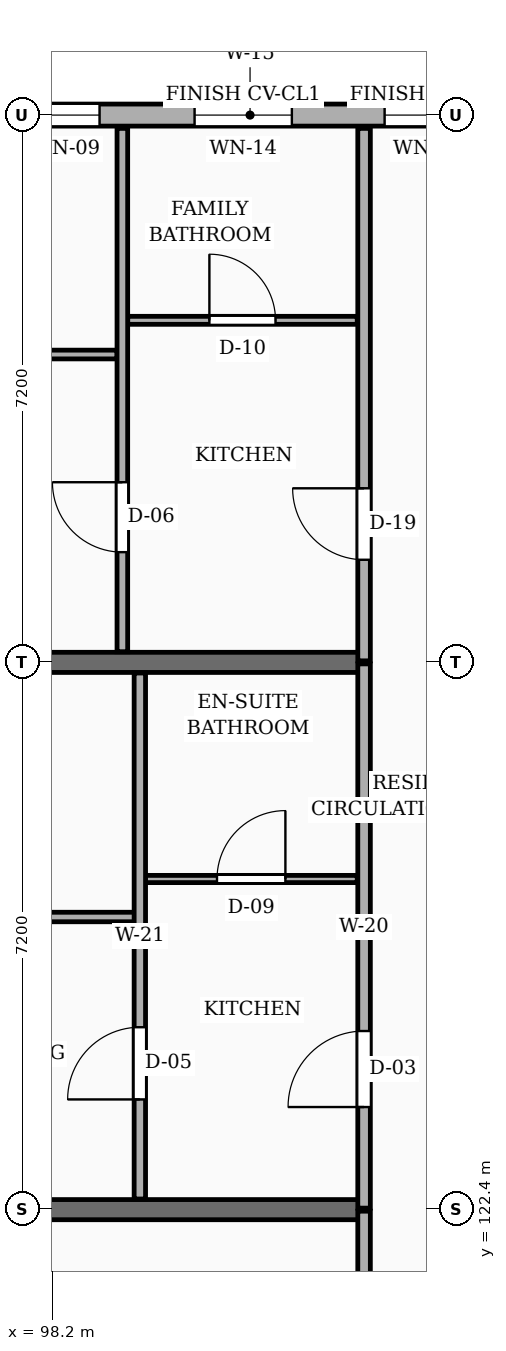
"""IFC4 building model, lengths in metres.
Left out: names, types, materials, properties, quantities, classifications, styles, units other than length and angle.
Written with IfcOpenShell. Run it as: python <this file> out.ifc"""

import sys

from ifc_helpers import new_model, si_unit, direction, frame, frame_2d, origin, place, context, subcontext, project, spatial, rectangle, extrude, element, fill, save


model = new_model("IFC4")
c1 = context("Model", 3, precision=1e-05, world=origin(), true_north=direction((0.0, 1.0)))
c2 = subcontext(c1, "Body", "Model", "MODEL_VIEW")
j1 = project(units=[si_unit("LENGTHUNIT", "METRE"), si_unit("PLANEANGLEUNIT", "RADIAN")], contexts=[c1])
p1 = place(None, origin())
s1 = spatial("IfcSite", under=j1, at=p1, CompositionType="ELEMENT")
p2 = place(p1, origin())
s2 = spatial("IfcBuilding", under=s1, at=p2, CompositionType="ELEMENT")
p3 = place(p2, frame((0.0, 0.0, 7.65)))
s3 = spatial("IfcBuildingStorey", under=s2, at=p3, CompositionType="ELEMENT", Elevation=7.65)
for number, where, z_axis, x_axis in (
    (1, (90.3, 122.4, 0.0), (0.0, 0.0, 1.0), (1.0, 0.0, 0.0)),
    (2, (90.3, 129.6, 0.0), (0.0, 0.0, 1.0), (1.0, 0.0, 0.0)),
):
    element("IfcWall", number, at=place(p3, frame(where, z_axis=z_axis, x_axis=x_axis)), inside=s3, PredefinedType="SOLIDWALL", context=c2, shape_type="SweptSolid", body=[
        extrude(rectangle(XDim=12.0, YDim=0.265, at=frame_2d((6.0, 0.0))), origin(), (0.0, 0.0, 1.0), 2.19),
    ])
p4 = place(p3, frame((104.1, 136.8, 0.0), z_axis=(0.0, 0.0, 1.0), x_axis=(-1.0, 0.0, 0.0)))
e3 = element("IfcWall", 3, at=p4, inside=s3, PredefinedType="SOLIDWALL", context=c2, shape_type="SweptSolid", body=[
    extrude(rectangle(XDim=6.6, YDim=0.29, at=frame_2d((3.3, 0.0))), origin(), (0.0, 0.0, 1.0), 2.46),
])
p5 = place(p4, frame((0.41, 0.0, 0.78)))
e4 = element("IfcOpeningElement", 4, at=p5, cuts=e3, PredefinedType="OPENING", context=c2, shape_type="SweptSolid", body=[
    extrude(rectangle(XDim=1.12, YDim=1.26, at=frame_2d((0.56, 0.63))), frame((0.0, 0.155, 0.0), z_axis=(0.0, -1.0, 0.0), x_axis=(1.0, 0.0, 0.0)), (0.0, 0.0, 1.0), 0.31),
])
p6 = place(p4, frame((2.75, 0.0, 0.78)))
e5 = element("IfcOpeningElement", 5, at=p6, cuts=e3, PredefinedType="OPENING", context=c2, shape_type="SweptSolid", body=[
    extrude(rectangle(XDim=1.28, YDim=1.26, at=frame_2d((0.64, 0.63))), frame((0.0, 0.155, 0.0), z_axis=(0.0, -1.0, 0.0), x_axis=(1.0, 0.0, 0.0)), (0.0, 0.0, 1.0), 0.31),
])
p7 = place(p4, frame((5.28, 0.0, 0.78)))
e6 = element("IfcOpeningElement", 6, at=p7, cuts=e3, PredefinedType="OPENING", context=c2, shape_type="SweptSolid", body=[
    extrude(rectangle(XDim=0.88, YDim=1.26, at=frame_2d((0.44, 0.63))), frame((0.0, 0.155, 0.0), z_axis=(0.0, -1.0, 0.0), x_axis=(1.0, 0.0, 0.0)), (0.0, 0.0, 1.0), 0.31),
])
p8 = place(p3, frame((102.3, 115.22, 0.0), z_axis=(0.0, 0.0, 1.0), x_axis=(0.0, 1.0, 0.0)))
e7 = element("IfcWall", 7, at=p8, inside=s3, PredefinedType="PARTITIONING", context=c2, shape_type="SweptSolid", body=[
    extrude(rectangle(XDim=7.16, YDim=0.165, at=frame_2d((3.58, 0.0))), origin(), (0.0, 0.0, 1.0), 2.325),
])
p9 = place(p8, frame((4.78, 0.0, 0.0)))
e8 = element("IfcOpeningElement", 8, at=p9, cuts=e7, PredefinedType="OPENING", context=c2, shape_type="SweptSolid", body=[
    extrude(rectangle(XDim=1.14, YDim=2.18, at=frame_2d((0.57, 1.09))), frame((0.0, 0.093, 0.0), z_axis=(0.0, -1.0, 0.0), x_axis=(1.0, 0.0, 0.0)), (0.0, 0.0, 1.0), 0.185),
])
p10 = place(p3, frame((102.3, 122.42, 0.0), z_axis=(0.0, 0.0, 1.0), x_axis=(0.0, 1.0, 0.0)))
e9 = element("IfcWall", 9, at=p10, inside=s3, PredefinedType="PARTITIONING", context=c2, shape_type="SweptSolid", body=[
    extrude(rectangle(XDim=7.16, YDim=0.165, at=frame_2d((3.58, 0.0))), origin(), (0.0, 0.0, 1.0), 2.325),
])
p11 = place(p10, frame((1.33, 0.0, 0.0)))
e10 = element("IfcOpeningElement", 10, at=p11, cuts=e9, PredefinedType="OPENING", context=c2, shape_type="SweptSolid", body=[
    extrude(rectangle(XDim=1.0, YDim=2.15, at=frame_2d((0.5, 1.075))), frame((0.0, 0.093, 0.0), z_axis=(0.0, -1.0, 0.0), x_axis=(1.0, 0.0, 0.0)), (0.0, 0.0, 1.0), 0.185),
])
p12 = place(p3, frame((102.3, 129.62, 0.0), z_axis=(0.0, 0.0, 1.0), x_axis=(0.0, 1.0, 0.0)))
e11 = element("IfcWall", 11, at=p12, inside=s3, PredefinedType="PARTITIONING", context=c2, shape_type="SweptSolid", body=[
    extrude(rectangle(XDim=7.005, YDim=0.165, at=frame_2d((3.502, 0.0))), origin(), (0.0, 0.0, 1.0), 2.325),
])
p13 = place(p12, frame((1.33, 0.0, 0.0)))
e12 = element("IfcOpeningElement", 12, at=p13, cuts=e11, PredefinedType="OPENING", context=c2, shape_type="SweptSolid", body=[
    extrude(rectangle(XDim=0.94, YDim=2.12, at=frame_2d((0.47, 1.06))), frame((0.0, 0.093, 0.0), z_axis=(0.0, -1.0, 0.0), x_axis=(1.0, 0.0, 0.0)), (0.0, 0.0, 1.0), 0.185),
])
p14 = place(p3, frame((90.175, 126.25, 0.0), z_axis=(0.0, 0.0, 1.0), x_axis=(1.0, 0.0, 0.0)))
e13 = element("IfcWall", 13, at=p14, inside=s3, PredefinedType="PARTITIONING", context=c2, shape_type="SweptSolid", body=[
    extrude(rectangle(XDim=9.105, YDim=0.125, at=frame_2d((4.552, 0.0))), origin(), (0.0, 0.0, 1.0), 2.325),
])
p15 = place(p14, frame((4.103, 0.0, 0.0)))
e14 = element("IfcOpeningElement", 14, at=p15, cuts=e13, PredefinedType="OPENING", context=c2, shape_type="SweptSolid", body=[
    extrude(rectangle(XDim=0.9, YDim=2.1, at=frame_2d((0.45, 1.05))), frame((0.0, 0.073, 0.0), z_axis=(0.0, -1.0, 0.0), x_axis=(1.0, 0.0, 0.0)), (0.0, 0.0, 1.0), 0.145),
])
p16 = place(p3, frame((99.42, 126.75, 0.0), z_axis=(0.0, 0.0, 1.0), x_axis=(1.0, 0.0, 0.0)))
e15 = element("IfcWall", 15, at=p16, inside=s3, PredefinedType="PARTITIONING", context=c2, shape_type="SweptSolid", body=[
    extrude(rectangle(XDim=2.79, YDim=0.095, at=frame_2d((1.395, 0.0))), origin(), (0.0, 0.0, 1.0), 2.325),
])
p17 = place(p16, frame((0.945, 0.0, 0.0)))
e16 = element("IfcOpeningElement", 16, at=p17, cuts=e15, PredefinedType="OPENING", context=c2, shape_type="SweptSolid", body=[
    extrude(rectangle(XDim=0.9, YDim=2.05, at=frame_2d((0.45, 1.025))), frame((0.0, 0.058, 0.0), z_axis=(0.0, -1.0, 0.0), x_axis=(1.0, 0.0, 0.0)), (0.0, 0.0, 1.0), 0.115),
])
p18 = place(p3, frame((99.35, 122.54, 0.0), z_axis=(0.0, 0.0, 1.0), x_axis=(0.0, 1.0, 0.0)))
e17 = element("IfcWall", 17, at=p18, inside=s3, PredefinedType="PARTITIONING", context=c2, shape_type="SweptSolid", body=[
    extrude(rectangle(XDim=6.92, YDim=0.15, at=frame_2d((3.46, 0.0))), origin(), (0.0, 0.0, 1.0), 2.325),
])
p19 = place(p18, frame((1.31, 0.0, 0.0)))
e18 = element("IfcOpeningElement", 18, at=p19, cuts=e17, PredefinedType="OPENING", context=c2, shape_type="SweptSolid", body=[
    extrude(rectangle(XDim=0.95, YDim=2.1, at=frame_2d((0.475, 1.05))), frame((0.0, 0.085, 0.0), z_axis=(0.0, -1.0, 0.0), x_axis=(1.0, 0.0, 0.0)), (0.0, 0.0, 1.0), 0.17),
])
p20 = place(p3, frame((90.175, 133.65, 0.0), z_axis=(0.0, 0.0, 1.0), x_axis=(1.0, 0.0, 0.0)))
e19 = element("IfcWall", 19, at=p20, inside=s3, PredefinedType="PARTITIONING", context=c2, shape_type="SweptSolid", body=[
    extrude(rectangle(XDim=8.875, YDim=0.115, at=frame_2d((4.438, 0.0))), origin(), (0.0, 0.0, 1.0), 2.325),
])
p21 = place(p20, frame((3.998, 0.0, 0.0)))
e20 = element("IfcOpeningElement", 20, at=p21, cuts=e19, PredefinedType="OPENING", context=c2, shape_type="SweptSolid", body=[
    extrude(rectangle(XDim=0.88, YDim=2.08, at=frame_2d((0.44, 1.04))), frame((0.0, 0.067, 0.0), z_axis=(0.0, -1.0, 0.0), x_axis=(1.0, 0.0, 0.0)), (0.0, 0.0, 1.0), 0.135),
])
p22 = place(p3, frame((99.19, 134.1, 0.0), z_axis=(0.0, 0.0, 1.0), x_axis=(1.0, 0.0, 0.0)))
e21 = element("IfcWall", 21, at=p22, inside=s3, PredefinedType="PARTITIONING", context=c2, shape_type="SweptSolid", body=[
    extrude(rectangle(XDim=3.02, YDim=0.105, at=frame_2d((1.51, 0.0))), origin(), (0.0, 0.0, 1.0), 2.325),
])
p23 = place(p22, frame((1.075, 0.0, 0.0)))
e22 = element("IfcOpeningElement", 22, at=p23, cuts=e21, PredefinedType="OPENING", context=c2, shape_type="SweptSolid", body=[
    extrude(rectangle(XDim=0.87, YDim=2.05, at=frame_2d((0.435, 1.025))), frame((0.0, 0.062, 0.0), z_axis=(0.0, -1.0, 0.0), x_axis=(1.0, 0.0, 0.0)), (0.0, 0.0, 1.0), 0.125),
])
p24 = place(p3, frame((99.12, 129.74, 0.0), z_axis=(0.0, 0.0, 1.0), x_axis=(0.0, 1.0, 0.0)))
e23 = element("IfcWall", 23, at=p24, inside=s3, PredefinedType="PARTITIONING", context=c2, shape_type="SweptSolid", body=[
    extrude(rectangle(XDim=6.885, YDim=0.14, at=frame_2d((3.442, 0.0))), origin(), (0.0, 0.0, 1.0), 2.325),
])
p25 = place(p24, frame((1.31, 0.0, 0.0)))
e24 = element("IfcOpeningElement", 24, at=p25, cuts=e23, PredefinedType="OPENING", context=c2, shape_type="SweptSolid", body=[
    extrude(rectangle(XDim=0.92, YDim=2.1, at=frame_2d((0.46, 1.05))), frame((0.0, 0.08, 0.0), z_axis=(0.0, -1.0, 0.0), x_axis=(1.0, 0.0, 0.0)), (0.0, 0.0, 1.0), 0.16),
])
p26 = place(p5, origin())
e25 = element("IfcWindow", 25, at=p26, inside=s3, PartitioningType="SINGLE_PANEL", PredefinedType="WINDOW", context=c2, shape_type="SweptSolid", body=[
    extrude(rectangle(XDim=1.12, YDim=1.26, at=frame_2d((0.56, 0.63))), frame((0.0, 0.03, 0.0), z_axis=(0.0, -1.0, 0.0), x_axis=(1.0, 0.0, 0.0)), (0.0, 0.0, 1.0), 0.06),
])
fill(e4, e25)
p27 = place(p6, origin())
e26 = element("IfcWindow", 26, at=p27, inside=s3, PartitioningType="SINGLE_PANEL", PredefinedType="WINDOW", context=c2, shape_type="SweptSolid", body=[
    extrude(rectangle(XDim=1.28, YDim=1.26, at=frame_2d((0.64, 0.63))), frame((0.0, 0.03, 0.0), z_axis=(0.0, -1.0, 0.0), x_axis=(1.0, 0.0, 0.0)), (0.0, 0.0, 1.0), 0.06),
])
fill(e5, e26)
p28 = place(p7, origin())
e27 = element("IfcWindow", 27, at=p28, inside=s3, PartitioningType="SINGLE_PANEL", PredefinedType="WINDOW", context=c2, shape_type="SweptSolid", body=[
    extrude(rectangle(XDim=0.88, YDim=1.26, at=frame_2d((0.44, 0.63))), frame((0.0, 0.03, 0.0), z_axis=(0.0, -1.0, 0.0), x_axis=(1.0, 0.0, 0.0)), (0.0, 0.0, 1.0), 0.06),
])
fill(e6, e27)
p29 = place(p11, origin())
e28 = element("IfcDoor", 28, at=p29, inside=s3, OperationType="SINGLE_SWING_LEFT", PredefinedType="DOOR", context=c2, shape_type="SweptSolid", body=[
    extrude(rectangle(XDim=1.0, YDim=2.15, at=frame_2d((0.5, 1.075))), frame((0.0, 0.025, 0.0), z_axis=(0.0, -1.0, 0.0), x_axis=(1.0, 0.0, 0.0)), (0.0, 0.0, 1.0), 0.05),
])
fill(e10, e28)
p30 = place(p13, origin())
e29 = element("IfcDoor", 29, at=p30, inside=s3, OperationType="SINGLE_SWING_RIGHT", PredefinedType="DOOR", context=c2, shape_type="SweptSolid", body=[
    extrude(rectangle(XDim=0.94, YDim=2.12, at=frame_2d((0.47, 1.06))), frame((0.0, 0.025, 0.0), z_axis=(0.0, -1.0, 0.0), x_axis=(1.0, 0.0, 0.0)), (0.0, 0.0, 1.0), 0.05),
])
fill(e12, e29)
p31 = place(p17, origin())
e30 = element("IfcDoor", 30, at=p31, inside=s3, OperationType="SINGLE_SWING_RIGHT", PredefinedType="DOOR", context=c2, shape_type="SweptSolid", body=[
    extrude(rectangle(XDim=0.9, YDim=2.05, at=frame_2d((0.45, 1.025))), frame((0.0, 0.025, 0.0), z_axis=(0.0, -1.0, 0.0), x_axis=(1.0, 0.0, 0.0)), (0.0, 0.0, 1.0), 0.05),
])
fill(e16, e30)
p32 = place(p19, origin())
e31 = element("IfcDoor", 31, at=p32, inside=s3, OperationType="SINGLE_SWING_LEFT", PredefinedType="DOOR", context=c2, shape_type="SweptSolid", body=[
    extrude(rectangle(XDim=0.95, YDim=2.1, at=frame_2d((0.475, 1.05))), frame((0.0, 0.025, 0.0), z_axis=(0.0, -1.0, 0.0), x_axis=(1.0, 0.0, 0.0)), (0.0, 0.0, 1.0), 0.05),
])
fill(e18, e31)
p33 = place(p23, origin())
e32 = element("IfcDoor", 32, at=p33, inside=s3, OperationType="SINGLE_SWING_LEFT", PredefinedType="DOOR", context=c2, shape_type="SweptSolid", body=[
    extrude(rectangle(XDim=0.87, YDim=2.05, at=frame_2d((0.435, 1.025))), frame((0.0, 0.025, 0.0), z_axis=(0.0, -1.0, 0.0), x_axis=(1.0, 0.0, 0.0)), (0.0, 0.0, 1.0), 0.05),
])
fill(e22, e32)
p34 = place(p25, origin())
e33 = element("IfcDoor", 33, at=p34, inside=s3, OperationType="SINGLE_SWING_RIGHT", PredefinedType="DOOR", context=c2, shape_type="SweptSolid", body=[
    extrude(rectangle(XDim=0.92, YDim=2.1, at=frame_2d((0.46, 1.05))), frame((0.0, 0.025, 0.0), z_axis=(0.0, -1.0, 0.0), x_axis=(1.0, 0.0, 0.0)), (0.0, 0.0, 1.0), 0.05),
])
fill(e24, e33)
save(model, sys.argv[1])
